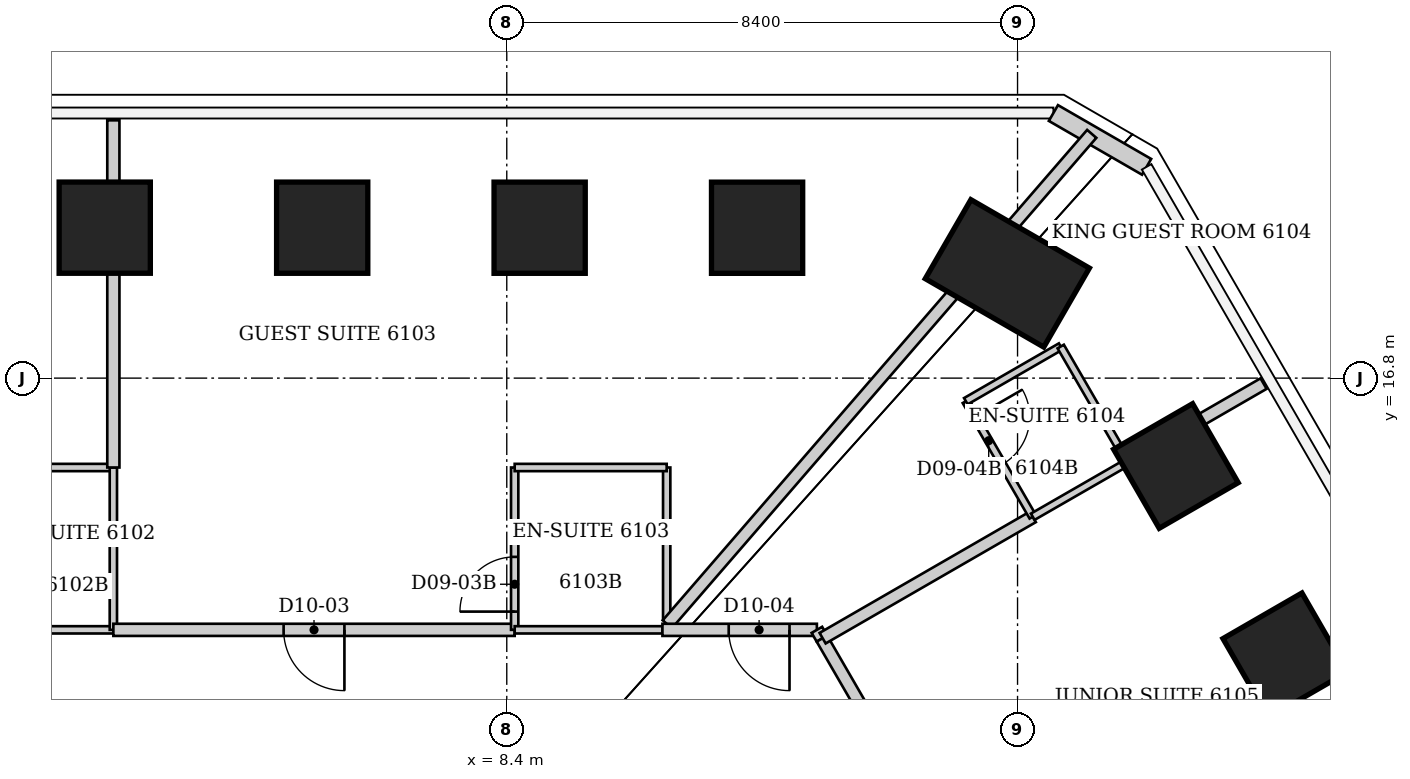
"""IFC4 building model, lengths in metres.
Left out: names, types, materials, properties, quantities, classifications, styles, units other than length and angle.
Written with IfcOpenShell. Run it as: python <this file> out.ifc"""

import sys

from ifc_helpers import new_model, si_unit, direction, frame, frame_2d, origin, origin_2d, place, context, subcontext, project, spatial, rectangle, extrude, element, fill, save


model = new_model("IFC4")
c1 = context("Model", 3, precision=1e-05, world=origin(), true_north=direction((0.0, 1.0)))
c2 = subcontext(c1, "Body", "Model", "MODEL_VIEW")
j1 = project(units=[si_unit("LENGTHUNIT", "METRE"), si_unit("PLANEANGLEUNIT", "RADIAN")], contexts=[c1])
p1 = place(None, origin())
s1 = spatial("IfcSite", under=j1, at=p1, CompositionType="ELEMENT")
p2 = place(p1, origin())
s2 = spatial("IfcBuilding", under=s1, at=p2, CompositionType="ELEMENT")
p3 = place(p2, frame((0.0, 0.0, 244.0)))
s3 = spatial("IfcBuildingStorey", under=s2, at=p3, CompositionType="ELEMENT", Elevation=244.0)
p4 = place(p3, frame((1.788, 19.275, 0.0), z_axis=(-0.005067855835, -0.054591712859, 0.998495899703), x_axis=(-0.000221054868, 0.998508758979, 0.054591293964)))
e1 = element("IfcColumn", 1, at=p4, inside=s3, PredefinedType="COLUMN", context=c2, shape_type="SweptSolid", body=[
    extrude(rectangle(XDim=1.5, YDim=1.5, at=origin_2d()), origin(), (0.0, 0.0, 1.0), 3.806),
])
p5 = place(p3, frame((5.365, 19.274, 0.0), z_axis=(-0.015202005844, -0.054586105372, 0.998393337377), x_axis=(-0.000673726901, 0.998509054749, 0.054582173615)))
e2 = element("IfcColumn", 2, at=p5, inside=s3, PredefinedType="COLUMN", context=c2, shape_type="SweptSolid", body=[
    extrude(rectangle(XDim=1.5, YDim=1.5, at=origin_2d()), origin(), (0.0, 0.0, 1.0), 3.806),
])
p6 = place(p3, frame((8.941, 19.274, 0.0), z_axis=(-0.025331473271, -0.054574895579, 0.998188307502), x_axis=(-0.00115198679, 0.998509652845, 0.054563230311)))
e3 = element("IfcColumn", 3, at=p6, inside=s3, PredefinedType="COLUMN", context=c2, shape_type="SweptSolid", body=[
    extrude(rectangle(XDim=1.5, YDim=1.5, at=origin_2d()), origin(), (0.0, 0.0, 1.0), 3.807),
])
p7 = place(p3, frame((12.517, 19.273, 0.0), z_axis=(-0.035389237911, -0.054494297508, 0.997886753785), x_axis=(-0.001945498476, 0.998514081693, 0.054459560185)))
e4 = element("IfcColumn", 4, at=p7, inside=s3, PredefinedType="COLUMN", context=c2, shape_type="SweptSolid", body=[
    extrude(rectangle(XDim=1.5, YDim=1.5, at=origin_2d()), origin(), (0.0, 0.0, 1.0), 3.808),
])
p8 = place(p3, frame((16.632, 18.523, 0.0), z_axis=(-0.047422507184, -0.052869687063, 0.997474762589), x_axis=(0.497441372682, 0.864710520134, 0.069482351101)))
e5 = element("IfcColumn", 5, at=p8, inside=s3, PredefinedType="COLUMN", context=c2, shape_type="SweptSolid", body=[
    extrude(rectangle(XDim=1.5, YDim=2.25, at=origin_2d()), origin(), (0.0, 0.0, 1.0), 3.81),
])
p9 = place(p3, frame((19.405, 15.355, 0.0), z_axis=(-0.05403142055, -0.042686745061, 0.997626406722), x_axis=(0.864743208297, 0.497572308908, 0.068124746696)))
e6 = element("IfcColumn", 6, at=p9, inside=s3, PredefinedType="COLUMN", context=c2, shape_type="SweptSolid", body=[
    extrude(rectangle(XDim=1.5, YDim=1.5, at=origin_2d()), origin(), (0.0, 0.0, 1.0), 3.809),
])
p10 = place(p3, frame((21.203, 12.241, 0.0), z_axis=(-0.05903355077, -0.034099727481, 0.997673417742), x_axis=(0.863904737752, 0.499019891948, 0.068174419916)))
e7 = element("IfcColumn", 7, at=p10, inside=s3, PredefinedType="COLUMN", context=c2, shape_type="SweptSolid", body=[
    extrude(rectangle(XDim=1.5, YDim=1.5, at=origin_2d()), origin(), (0.0, 0.0, 1.0), 3.809),
])
p11 = place(p3, frame((17.39, 21.16, 0.0), z_axis=(0.0, 0.0, 1.0), x_axis=(0.866036293601, -0.499981137809, 0.0)))
e8 = element("IfcWall", 8, at=p11, inside=s3, PredefinedType="SOLIDWALL", context=c2, shape_type="SweptSolid", body=[
    extrude(rectangle(XDim=1.77, YDim=0.3, at=frame_2d((0.885, 0.0))), origin(), (0.0, 0.0, 1.0), 3.64),
])
for number, where, z_axis, x_axis in (
    (9, (1.93, 12.66, 0.0), (0.0, 0.0, 1.0), (-1.0, 0.0, 0.0)),
    (10, (1.93, 15.33, 0.0), (0.0, 0.0, 1.0), (-1.0, 0.0, 0.0)),
):
    element("IfcWall", number, at=place(p3, frame(where, z_axis=z_axis, x_axis=x_axis)), inside=s3, PredefinedType="PARTITIONING", context=c2, shape_type="SweptSolid", body=[
        extrude(rectangle(XDim=2.45, YDim=0.12, at=frame_2d((1.225, 0.0))), origin(), (0.0, 0.0, 1.0), 3.64),
    ])
p12 = place(p3, frame((1.93, 15.33, 0.0), z_axis=(0.0, 0.0, 1.0), x_axis=(0.0, -1.0, 0.0)))
e11 = element("IfcWall", 11, at=p12, inside=s3, PredefinedType="PARTITIONING", context=c2, shape_type="SweptSolid", body=[
    extrude(rectangle(XDim=2.67, YDim=0.12, at=frame_2d((1.335, 0.0))), origin(), (0.0, 0.0, 1.0), 3.64),
])
p13 = place(p3, frame((1.93, 21.04, 0.0), z_axis=(0.0, 0.0, 1.0), x_axis=(0.0, -1.0, 0.0)))
e12 = element("IfcWall", 12, at=p13, inside=s3, PredefinedType="PARTITIONING", context=c2, shape_type="SweptSolid", body=[
    extrude(rectangle(XDim=5.71, YDim=0.2, at=frame_2d((2.855, 0.0))), origin(), (0.0, 0.0, 1.0), 3.64),
])
p14 = place(p3, frame((8.53, 12.66, 0.0), z_axis=(0.0, 0.0, 1.0), x_axis=(-1.0, 0.0, 0.0)))
e13 = element("IfcWall", 13, at=p14, inside=s3, PredefinedType="PARTITIONING", context=c2, shape_type="SweptSolid", body=[
    extrude(rectangle(XDim=6.6, YDim=0.2, at=frame_2d((3.3, 0.0))), origin(), (0.0, 0.0, 1.0), 3.64),
])
p15 = place(p14, frame((2.8, 0.0, 0.0)))
e14 = element("IfcOpeningElement", 14, at=p15, cuts=e13, PredefinedType="OPENING", context=c2, shape_type="SweptSolid", body=[
    extrude(rectangle(XDim=1.0, YDim=2.13, at=frame_2d((0.5, 1.065))), frame((0.0, 0.1, 0.0), z_axis=(0.0, -1.0, 0.0), x_axis=(1.0, 0.0, 0.0)), (0.0, 0.0, 1.0), 0.2),
])
p16 = place(p3, frame((8.53, 15.33, 0.0), z_axis=(0.0, 0.0, 1.0), x_axis=(0.0, -1.0, 0.0)))
e15 = element("IfcWall", 15, at=p16, inside=s3, PredefinedType="PARTITIONING", context=c2, shape_type="SweptSolid", body=[
    extrude(rectangle(XDim=2.67, YDim=0.12, at=frame_2d((1.335, 0.0))), origin(), (0.0, 0.0, 1.0), 3.64),
])
p17 = place(p16, frame((1.47, 0.0, 0.0)))
e16 = element("IfcOpeningElement", 16, at=p17, cuts=e15, PredefinedType="OPENING", context=c2, shape_type="SweptSolid", body=[
    extrude(rectangle(XDim=0.9, YDim=2.03, at=frame_2d((0.45, 1.015))), frame((0.0, 0.06, 0.0), z_axis=(0.0, -1.0, 0.0), x_axis=(1.0, 0.0, 0.0)), (0.0, 0.0, 1.0), 0.12),
])
p18 = place(p3, frame((10.96, 12.66, 0.0), z_axis=(0.0, 0.0, 1.0), x_axis=(-1.0, 0.0, 0.0)))
e17 = element("IfcWall", 17, at=p18, inside=s3, PredefinedType="PARTITIONING", context=c2, shape_type="SweptSolid", body=[
    extrude(rectangle(XDim=2.43, YDim=0.12, at=frame_2d((1.215, 0.0))), origin(), (0.0, 0.0, 1.0), 3.64),
])
for number, where, z_axis, x_axis in (
    (18, (11.03, 12.83, 0.0), (0.0, 0.0, 1.0), (0.0, 1.0, 0.0)),
    (19, (11.03, 15.33, 0.0), (0.0, 0.0, 1.0), (-1.0, 0.0, 0.0)),
):
    element("IfcWall", number, at=place(p3, frame(where, z_axis=z_axis, x_axis=x_axis)), inside=s3, PredefinedType="PARTITIONING", context=c2, shape_type="SweptSolid", body=[
        extrude(rectangle(XDim=2.5, YDim=0.12, at=frame_2d((1.25, 0.0))), origin(), (0.0, 0.0, 1.0), 3.64),
    ])
p19 = place(p3, frame((11.04, 12.751, 0.0), z_axis=(0.0, 0.0, 1.0), x_axis=(0.654384042683, 0.756162366613, 0.0)))
e20 = element("IfcWall", 20, at=p19, inside=s3, PredefinedType="PARTITIONING", context=c2, shape_type="SweptSolid", body=[
    extrude(rectangle(XDim=10.667, YDim=0.2, at=frame_2d((5.333, 0.0))), origin(), (0.0, 0.0, 1.0), 3.64),
])
p20 = place(p3, frame((13.5, 12.66, 0.0), z_axis=(0.0, 0.0, 1.0), x_axis=(-1.0, 0.0, 0.0)))
e21 = element("IfcWall", 21, at=p20, inside=s3, PredefinedType="PARTITIONING", context=c2, shape_type="SweptSolid", body=[
    extrude(rectangle(XDim=2.54, YDim=0.2, at=frame_2d((1.27, 0.0))), origin(), (0.0, 0.0, 1.0), 3.64),
])
p21 = place(p20, frame((0.45, 0.0, 0.0)))
e22 = element("IfcOpeningElement", 22, at=p21, cuts=e21, PredefinedType="OPENING", context=c2, shape_type="SweptSolid", body=[
    extrude(rectangle(XDim=1.0, YDim=2.13, at=frame_2d((0.5, 1.065))), frame((0.0, 0.1, 0.0), z_axis=(0.0, -1.0, 0.0), x_axis=(1.0, 0.0, 0.0)), (0.0, 0.0, 1.0), 0.2),
])
p22 = place(p3, frame((13.5, 12.66, 0.0), z_axis=(0.0, 0.0, 1.0), x_axis=(0.501036270542, -0.865426285481, 0.0)))
e23 = element("IfcWall", 23, at=p22, inside=s3, PredefinedType="PARTITIONING", context=c2, shape_type="SweptSolid", body=[
    extrude(rectangle(XDim=0.166, YDim=0.2, at=frame_2d((0.083, 0.0))), origin(), (0.0, 0.0, 1.0), 3.64),
])
p23 = place(p3, frame((13.583, 12.516, 0.0), z_axis=(0.0, 0.0, 1.0), x_axis=(0.500743006408, -0.865596003649, 0.0)))
e24 = element("IfcWall", 24, at=p23, inside=s3, PredefinedType="PARTITIONING", context=c2, shape_type="SweptSolid", body=[
    extrude(rectangle(XDim=5.645, YDim=0.2, at=frame_2d((2.823, 0.0))), origin(), (0.0, 0.0, 1.0), 3.64),
])
p24 = place(p23, frame((2.323, 0.0, 0.0)))
e25 = element("IfcOpeningElement", 25, at=p24, cuts=e24, PredefinedType="OPENING", context=c2, shape_type="SweptSolid", body=[
    extrude(rectangle(XDim=1.0, YDim=2.13, at=frame_2d((0.5, 1.065))), frame((0.0, 0.1, 0.0), z_axis=(0.0, -1.0, 0.0), x_axis=(1.0, 0.0, 0.0)), (0.0, 0.0, 1.0), 0.2),
])
p25 = place(p3, frame((13.594, 12.522, 0.0), z_axis=(0.0, 0.0, 1.0), x_axis=(0.866085778049, 0.499895414124, 0.0)))
e26 = element("IfcWall", 26, at=p25, inside=s3, PredefinedType="PARTITIONING", context=c2, shape_type="SweptSolid", body=[
    extrude(rectangle(XDim=3.991, YDim=0.2, at=frame_2d((1.996, 0.0))), origin(), (0.0, 0.0, 1.0), 3.64),
])
p26 = place(p3, frame((15.95, 16.42, 0.0), z_axis=(0.0, 0.0, 1.0), x_axis=(0.501088872721, -0.865395829453, 0.0)))
e27 = element("IfcWall", 27, at=p26, inside=s3, PredefinedType="PARTITIONING", context=c2, shape_type="SweptSolid", body=[
    extrude(rectangle(XDim=2.195, YDim=0.12, at=frame_2d((1.098, 0.0))), origin(), (0.0, 0.0, 1.0), 3.64),
])
p27 = place(p26, frame((0.3, 0.0, 0.0)))
e28 = element("IfcOpeningElement", 28, at=p27, cuts=e27, PredefinedType="OPENING", context=c2, shape_type="SweptSolid", body=[
    extrude(rectangle(XDim=0.9, YDim=2.03, at=frame_2d((0.45, 1.015))), frame((0.0, 0.06, 0.0), z_axis=(0.0, -1.0, 0.0), x_axis=(1.0, 0.0, 0.0)), (0.0, 0.0, 1.0), 0.12),
])
for number, where, z_axis, x_axis in (
    (29, (17.05, 14.52, 0.0), (0.0, 0.0, 1.0), (0.867, 0.499, 0.0)),
    (30, (17.51, 17.32, 0.0), (0.0, 0.0, 1.0), (-0.866, -0.5, 0.0)),
):
    element("IfcWall", number, at=place(p3, frame(where, z_axis=z_axis, x_axis=x_axis)), inside=s3, PredefinedType="PARTITIONING", context=c2, shape_type="SweptSolid", body=[
        extrude(rectangle(XDim=1.801, YDim=0.12, at=frame_2d((0.9, 0.0))), origin(), (0.0, 0.0, 1.0), 3.64),
    ])
p28 = place(p3, frame((18.61, 15.42, 0.0), z_axis=(0.0, 0.0, 1.0), x_axis=(-0.501040653706, 0.865423747845, 0.0)))
e31 = element("IfcWall", 31, at=p28, inside=s3, PredefinedType="PARTITIONING", context=c2, shape_type="SweptSolid", body=[
    extrude(rectangle(XDim=2.196, YDim=0.12, at=frame_2d((1.098, 0.0))), origin(), (0.0, 0.0, 1.0), 2.14),
])
p29 = place(p3, frame((18.611, 15.418, 0.0), z_axis=(0.0, 0.0, 1.0), x_axis=(0.865870535136, 0.500268144481, 0.0)))
e32 = element("IfcWall", 32, at=p29, inside=s3, PredefinedType="PARTITIONING", context=c2, shape_type="SweptSolid", body=[
    extrude(rectangle(XDim=2.582, YDim=0.2, at=frame_2d((1.291, 0.0))), origin(), (0.0, 0.0, 1.0), 3.64),
])
p30 = place(p15, origin())
e33 = element("IfcDoor", 33, at=p30, inside=s3, OperationType="SINGLE_SWING_LEFT", PredefinedType="DOOR", context=c2, shape_type="SweptSolid", body=[
    extrude(rectangle(XDim=1.0, YDim=2.13, at=frame_2d((0.5, 1.065))), frame((0.0, 0.025, 0.0), z_axis=(0.0, -1.0, 0.0), x_axis=(1.0, 0.0, 0.0)), (0.0, 0.0, 1.0), 0.05),
])
fill(e14, e33)
p31 = place(p17, origin())
e34 = element("IfcDoor", 34, at=p31, inside=s3, OperationType="SINGLE_SWING_RIGHT", PredefinedType="DOOR", context=c2, shape_type="SweptSolid", body=[
    extrude(rectangle(XDim=0.9, YDim=2.03, at=frame_2d((0.45, 1.015))), frame((0.0, 0.025, 0.0), z_axis=(0.0, -1.0, 0.0), x_axis=(1.0, 0.0, 0.0)), (0.0, 0.0, 1.0), 0.05),
])
fill(e16, e34)
p32 = place(p21, origin())
e35 = element("IfcDoor", 35, at=p32, inside=s3, OperationType="SINGLE_SWING_LEFT", PredefinedType="DOOR", context=c2, shape_type="SweptSolid", body=[
    extrude(rectangle(XDim=1.0, YDim=2.13, at=frame_2d((0.5, 1.065))), frame((0.0, 0.025, 0.0), z_axis=(0.0, -1.0, 0.0), x_axis=(1.0, 0.0, 0.0)), (0.0, 0.0, 1.0), 0.05),
])
fill(e22, e35)
p33 = place(p27, origin())
e36 = element("IfcDoor", 36, at=p33, inside=s3, OperationType="SINGLE_SWING_LEFT", PredefinedType="DOOR", context=c2, shape_type="SweptSolid", body=[
    extrude(rectangle(XDim=0.9, YDim=2.03, at=frame_2d((0.45, 1.015))), frame((0.0, 0.025, 0.0), z_axis=(0.0, -1.0, 0.0), x_axis=(1.0, 0.0, 0.0)), (0.0, 0.0, 1.0), 0.05),
])
fill(e28, e36)
save(model, sys.argv[1])
